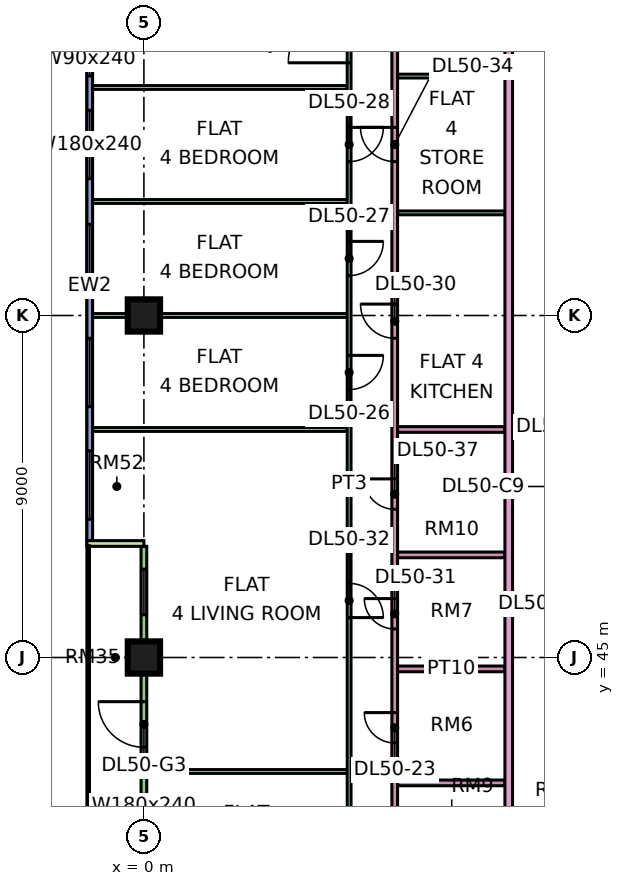
"""IFC4 building model, lengths in metres.
Left out: names, types, materials, properties, quantities, classifications, styles, units other than length and angle.
Written with IfcOpenShell. Run it as: python <this file> out.ifc"""

import sys

from ifc_helpers import new_model, si_unit, direction, frame, frame_2d, origin, origin_2d, place, context, subcontext, project, spatial, rectangle, extrude, element, fill, save


model = new_model("IFC4")
c1 = context("Model", 3, precision=1e-05, world=origin(), true_north=direction((0.0, 1.0)))
c2 = subcontext(c1, "Body", "Model", "MODEL_VIEW")
j1 = project(units=[si_unit("LENGTHUNIT", "METRE"), si_unit("PLANEANGLEUNIT", "RADIAN")], contexts=[c1])
p1 = place(None, origin())
s1 = spatial("IfcSite", under=j1, at=p1, CompositionType="ELEMENT")
p2 = place(p1, origin())
s2 = spatial("IfcBuilding", under=s1, at=p2, CompositionType="ELEMENT")
p3 = place(p2, frame((0.0, 0.0, 215.4)))
s3 = spatial("IfcBuildingStorey", under=s2, at=p3, CompositionType="ELEMENT", Elevation=215.4)
for number, where, z_axis, x_axis in (
    (1, (0.0, 45.0, 0.0), (0.0, 0.0, 1.0), (1.0, 0.0, 0.0)),
    (2, (0.0, 54.0, 0.0), (0.0, 0.0, 1.0), (1.0, 0.0, 0.0)),
):
    element("IfcColumn", number, at=place(p3, frame(where, z_axis=z_axis, x_axis=x_axis)), inside=s3, PredefinedType="COLUMN", context=c2, shape_type="SweptSolid", body=[
        extrude(rectangle(XDim=0.85, YDim=0.85, at=origin_2d()), origin(), (0.0, 0.0, 1.0), 3.75),
    ])
p4 = place(p3, frame((-1.425, 61.5, 0.0), z_axis=(0.0, 0.0, 1.0), x_axis=(0.0, -1.0, 0.0)))
e3 = element("IfcWall", 3, at=p4, inside=s3, PredefinedType="SOLIDWALL", context=c2, shape_type="SweptSolid", body=[
    extrude(rectangle(XDim=13.425, YDim=0.15, at=frame_2d((6.712, 0.0))), origin(), (0.0, 0.0, 1.0), 3.35),
])
p5 = place(p4, frame((0.3, 0.0, 0.45)))
e4 = element("IfcOpeningElement", 4, at=p5, cuts=e3, PredefinedType="OPENING", context=c2, shape_type="SweptSolid", body=[
    extrude(rectangle(XDim=0.9, YDim=2.4, at=frame_2d((0.45, 1.2))), frame((0.0, 0.085, 0.0), z_axis=(0.0, -1.0, 0.0), x_axis=(1.0, 0.0, 0.0)), (0.0, 0.0, 1.0), 0.17),
])
p6 = place(p4, frame((2.1, 0.0, 0.45)))
e5 = element("IfcOpeningElement", 5, at=p6, cuts=e3, PredefinedType="OPENING", context=c2, shape_type="SweptSolid", body=[
    extrude(rectangle(XDim=1.8, YDim=2.4, at=frame_2d((0.9, 1.2))), frame((0.0, 0.085, 0.0), z_axis=(0.0, -1.0, 0.0), x_axis=(1.0, 0.0, 0.0)), (0.0, 0.0, 1.0), 0.17),
])
p7 = place(p4, frame((5.1, 0.0, 0.45)))
e6 = element("IfcOpeningElement", 6, at=p7, cuts=e3, PredefinedType="OPENING", context=c2, shape_type="SweptSolid", body=[
    extrude(rectangle(XDim=1.8, YDim=2.4, at=frame_2d((0.9, 1.2))), frame((0.0, 0.085, 0.0), z_axis=(0.0, -1.0, 0.0), x_axis=(1.0, 0.0, 0.0)), (0.0, 0.0, 1.0), 0.17),
])
p8 = place(p4, frame((8.1, 0.0, 0.45)))
e7 = element("IfcOpeningElement", 7, at=p8, cuts=e3, PredefinedType="OPENING", context=c2, shape_type="SweptSolid", body=[
    extrude(rectangle(XDim=1.8, YDim=2.4, at=frame_2d((0.9, 1.2))), frame((0.0, 0.085, 0.0), z_axis=(0.0, -1.0, 0.0), x_axis=(1.0, 0.0, 0.0)), (0.0, 0.0, 1.0), 0.17),
])
p9 = place(p4, frame((11.062, 0.0, 0.45)))
e8 = element("IfcOpeningElement", 8, at=p9, cuts=e3, PredefinedType="OPENING", context=c2, shape_type="SweptSolid", body=[
    extrude(rectangle(XDim=1.8, YDim=2.4, at=frame_2d((0.9, 1.2))), frame((0.0, 0.085, 0.0), z_axis=(0.0, -1.0, 0.0), x_axis=(1.0, 0.0, 0.0)), (0.0, 0.0, 1.0), 0.17),
])
p10 = place(p3, frame((0.0, 47.925, 0.0), z_axis=(0.0, 0.0, 1.0), x_axis=(0.0, -1.0, 0.0)))
e9 = element("IfcWall", 9, at=p10, inside=s3, PredefinedType="SOLIDWALL", context=c2, shape_type="SweptSolid", body=[
    extrude(rectangle(XDim=11.85, YDim=0.15, at=frame_2d((5.925, 0.0))), origin(), (0.0, 0.0, 1.0), 3.35),
])
p11 = place(p10, frame((0.6, 0.0, 0.45)))
e10 = element("IfcOpeningElement", 10, at=p11, cuts=e9, PredefinedType="OPENING", context=c2, shape_type="SweptSolid", body=[
    extrude(rectangle(XDim=1.2, YDim=2.4, at=frame_2d((0.6, 1.2))), frame((0.0, 0.085, 0.0), z_axis=(0.0, -1.0, 0.0), x_axis=(1.0, 0.0, 0.0)), (0.0, 0.0, 1.0), 0.17),
])
p12 = place(p10, frame((4.087, 0.0, 0.0)))
e11 = element("IfcOpeningElement", 11, at=p12, cuts=e9, PredefinedType="OPENING", context=c2, shape_type="SweptSolid", body=[
    extrude(rectangle(XDim=1.2, YDim=2.4, at=frame_2d((0.6, 1.2))), frame((0.0, 0.085, 0.0), z_axis=(0.0, -1.0, 0.0), x_axis=(1.0, 0.0, 0.0)), (0.0, 0.0, 1.0), 0.17),
])
p13 = place(p10, frame((6.525, 0.0, 0.45)))
e12 = element("IfcOpeningElement", 12, at=p13, cuts=e9, PredefinedType="OPENING", context=c2, shape_type="SweptSolid", body=[
    extrude(rectangle(XDim=1.8, YDim=2.4, at=frame_2d((0.9, 1.2))), frame((0.0, 0.085, 0.0), z_axis=(0.0, -1.0, 0.0), x_axis=(1.0, 0.0, 0.0)), (0.0, 0.0, 1.0), 0.17),
])
p14 = place(p10, frame((9.562, 0.0, 0.45)))
e13 = element("IfcOpeningElement", 13, at=p14, cuts=e9, PredefinedType="OPENING", context=c2, shape_type="SweptSolid", body=[
    extrude(rectangle(XDim=1.2, YDim=2.4, at=frame_2d((0.6, 1.2))), frame((0.0, 0.085, 0.0), z_axis=(0.0, -1.0, 0.0), x_axis=(1.0, 0.0, 0.0)), (0.0, 0.0, 1.0), 0.17),
])
p15 = place(p3, frame((-1.5, 48.0, 0.0), z_axis=(0.0, 0.0, 1.0), x_axis=(1.0, 0.0, 0.0)))
e14 = element("IfcWall", 14, at=p15, inside=s3, PredefinedType="SOLIDWALL", context=c2, shape_type="SweptSolid", body=[
    extrude(rectangle(XDim=1.5, YDim=0.15, at=frame_2d((0.75, 0.0))), origin(), (0.0, 0.0, 1.0), 3.35),
])
for number, where, z_axis, x_axis in (
    (15, (-1.351, 54.0, 0.0), (0.0, 0.0, 1.0), (1.0, 0.0, 0.0)),
    (16, (-1.351, 57.0, 0.0), (0.0, 0.0, 1.0), (1.0, 0.0, 0.0)),
    (17, (-1.351, 60.0, 0.0), (0.0, 0.0, 1.0), (1.0, 0.0, 0.0)),
):
    element("IfcWall", number, at=place(p3, frame(where, z_axis=z_axis, x_axis=x_axis)), inside=s3, PredefinedType="PARTITIONING", context=c2, shape_type="SweptSolid", body=[
        extrude(rectangle(XDim=6.701, YDim=0.1, at=frame_2d((3.351, 0.0))), origin(), (0.0, 0.0, 1.0), 3.35),
    ])
p16 = place(p3, frame((-1.35, 51.0, 0.0), z_axis=(0.0, 0.0, 1.0), x_axis=(1.0, 0.0, 0.0)))
e18 = element("IfcWall", 18, at=p16, inside=s3, PredefinedType="PARTITIONING", context=c2, shape_type="SweptSolid", body=[
    extrude(rectangle(XDim=6.7, YDim=0.1, at=frame_2d((3.35, 0.0))), origin(), (0.0, 0.0, 1.0), 3.35),
])
p17 = place(p3, frame((0.074, 42.0, 0.0), z_axis=(0.0, 0.0, 1.0), x_axis=(1.0, 0.0, 0.0)))
e19 = element("IfcWall", 19, at=p17, inside=s3, PredefinedType="PARTITIONING", context=c2, shape_type="SweptSolid", body=[
    extrude(rectangle(XDim=5.276, YDim=0.1, at=frame_2d((2.638, 0.0))), origin(), (0.0, 0.0, 1.0), 3.35),
])
p18 = place(p3, frame((5.4, 36.1, 0.0), z_axis=(0.0, 0.0, 1.0), x_axis=(0.0, 1.0, 0.0)))
e20 = element("IfcWall", 20, at=p18, inside=s3, PredefinedType="PARTITIONING", context=c2, shape_type="SweptSolid", body=[
    extrude(rectangle(XDim=26.95, YDim=0.1, at=frame_2d((13.475, 0.0))), origin(), (0.0, 0.0, 1.0), 3.35),
])
p19 = place(p18, frame((0.95, 0.0, 0.0)))
e21 = element("IfcOpeningElement", 21, at=p19, cuts=e20, PredefinedType="OPENING", context=c2, shape_type="SweptSolid", body=[
    extrude(rectangle(XDim=0.9, YDim=2.1, at=frame_2d((0.45, 1.05))), frame((0.0, 0.06, 0.0), z_axis=(0.0, -1.0, 0.0), x_axis=(1.0, 0.0, 0.0)), (0.0, 0.0, 1.0), 0.12),
])
p20 = place(p18, frame((3.95, 0.0, 0.0)))
e22 = element("IfcOpeningElement", 22, at=p20, cuts=e20, PredefinedType="OPENING", context=c2, shape_type="SweptSolid", body=[
    extrude(rectangle(XDim=0.9, YDim=2.1, at=frame_2d((0.45, 1.05))), frame((0.0, 0.06, 0.0), z_axis=(0.0, -1.0, 0.0), x_axis=(1.0, 0.0, 0.0)), (0.0, 0.0, 1.0), 0.12),
])
p21 = place(p18, frame((15.95, 0.0, 0.0)))
e23 = element("IfcOpeningElement", 23, at=p21, cuts=e20, PredefinedType="OPENING", context=c2, shape_type="SweptSolid", body=[
    extrude(rectangle(XDim=0.9, YDim=2.1, at=frame_2d((0.45, 1.05))), frame((0.0, 0.06, 0.0), z_axis=(0.0, -1.0, 0.0), x_axis=(1.0, 0.0, 0.0)), (0.0, 0.0, 1.0), 0.12),
])
p22 = place(p18, frame((18.95, 0.0, 0.0)))
e24 = element("IfcOpeningElement", 24, at=p22, cuts=e20, PredefinedType="OPENING", context=c2, shape_type="SweptSolid", body=[
    extrude(rectangle(XDim=0.9, YDim=2.1, at=frame_2d((0.45, 1.05))), frame((0.0, 0.06, 0.0), z_axis=(0.0, -1.0, 0.0), x_axis=(1.0, 0.0, 0.0)), (0.0, 0.0, 1.0), 0.12),
])
p23 = place(p18, frame((21.95, 0.0, 0.0)))
e25 = element("IfcOpeningElement", 25, at=p23, cuts=e20, PredefinedType="OPENING", context=c2, shape_type="SweptSolid", body=[
    extrude(rectangle(XDim=0.9, YDim=2.1, at=frame_2d((0.45, 1.05))), frame((0.0, 0.06, 0.0), z_axis=(0.0, -1.0, 0.0), x_axis=(1.0, 0.0, 0.0)), (0.0, 0.0, 1.0), 0.12),
])
p24 = place(p18, frame((9.95, 0.0, 0.0)))
e26 = element("IfcOpeningElement", 26, at=p24, cuts=e20, PredefinedType="OPENING", context=c2, shape_type="SweptSolid", body=[
    extrude(rectangle(XDim=0.9, YDim=2.1, at=frame_2d((0.45, 1.05))), frame((0.0, 0.06, 0.0), z_axis=(0.0, -1.0, 0.0), x_axis=(1.0, 0.0, 0.0)), (0.0, 0.0, 1.0), 0.12),
])
p25 = place(p18, frame((24.55, 0.0, 0.0)))
e27 = element("IfcOpeningElement", 27, at=p25, cuts=e20, PredefinedType="OPENING", context=c2, shape_type="SweptSolid", body=[
    extrude(rectangle(XDim=1.6, YDim=2.1, at=frame_2d((0.8, 1.05))), frame((0.0, 0.06, 0.0), z_axis=(0.0, -1.0, 0.0), x_axis=(1.0, 0.0, 0.0)), (0.0, 0.0, 1.0), 0.12),
])
p26 = place(p3, frame((6.6, 39.525, 0.0), z_axis=(0.0, 0.0, 1.0), x_axis=(0.0, 1.0, 0.0)))
e28 = element("IfcWall", 28, at=p26, inside=s3, PredefinedType="PARTITIONING", context=c2, shape_type="SweptSolid", body=[
    extrude(rectangle(XDim=24.825, YDim=0.15, at=frame_2d((12.413, 0.0))), origin(), (0.0, 0.0, 1.0), 3.35),
])
p27 = place(p26, frame((3.225, 0.0, 0.0)))
e29 = element("IfcOpeningElement", 29, at=p27, cuts=e28, PredefinedType="OPENING", context=c2, shape_type="SweptSolid", body=[
    extrude(rectangle(XDim=0.8, YDim=2.1, at=frame_2d((0.4, 1.05))), frame((0.0, 0.085, 0.0), z_axis=(0.0, -1.0, 0.0), x_axis=(1.0, 0.0, 0.0)), (0.0, 0.0, 1.0), 0.17),
])
p28 = place(p26, frame((13.875, 0.0, 0.0)))
e30 = element("IfcOpeningElement", 30, at=p28, cuts=e28, PredefinedType="OPENING", context=c2, shape_type="SweptSolid", body=[
    extrude(rectangle(XDim=0.9, YDim=2.1, at=frame_2d((0.45, 1.05))), frame((0.0, 0.085, 0.0), z_axis=(0.0, -1.0, 0.0), x_axis=(1.0, 0.0, 0.0)), (0.0, 0.0, 1.0), 0.17),
])
p29 = place(p26, frame((6.225, 0.0, 0.0)))
e31 = element("IfcOpeningElement", 31, at=p29, cuts=e28, PredefinedType="OPENING", context=c2, shape_type="SweptSolid", body=[
    extrude(rectangle(XDim=0.8, YDim=2.1, at=frame_2d((0.4, 1.05))), frame((0.0, 0.085, 0.0), z_axis=(0.0, -1.0, 0.0), x_axis=(1.0, 0.0, 0.0)), (0.0, 0.0, 1.0), 0.17),
])
p30 = place(p26, frame((18.525, 0.0, 0.0)))
e32 = element("IfcOpeningElement", 32, at=p30, cuts=e28, PredefinedType="OPENING", context=c2, shape_type="SweptSolid", body=[
    extrude(rectangle(XDim=0.9, YDim=2.1, at=frame_2d((0.45, 1.05))), frame((0.0, 0.085, 0.0), z_axis=(0.0, -1.0, 0.0), x_axis=(1.0, 0.0, 0.0)), (0.0, 0.0, 1.0), 0.17),
])
p31 = place(p26, frame((21.675, 0.0, 0.0)))
e33 = element("IfcOpeningElement", 33, at=p31, cuts=e28, PredefinedType="OPENING", context=c2, shape_type="SweptSolid", body=[
    extrude(rectangle(XDim=0.9, YDim=2.1, at=frame_2d((0.45, 1.05))), frame((0.0, 0.085, 0.0), z_axis=(0.0, -1.0, 0.0), x_axis=(1.0, 0.0, 0.0)), (0.0, 0.0, 1.0), 0.17),
])
p32 = place(p26, frame((9.375, 0.0, 0.0)))
e34 = element("IfcOpeningElement", 34, at=p32, cuts=e28, PredefinedType="OPENING", context=c2, shape_type="SweptSolid", body=[
    extrude(rectangle(XDim=0.8, YDim=2.1, at=frame_2d((0.4, 1.05))), frame((0.0, 0.085, 0.0), z_axis=(0.0, -1.0, 0.0), x_axis=(1.0, 0.0, 0.0)), (0.0, 0.0, 1.0), 0.17),
])
for number, where, z_axis, x_axis in (
    (35, (6.675, 41.7, 0.0), (0.0, 0.0, 1.0), (1.0, 0.0, 0.0)),
    (36, (6.675, 44.7, 0.0), (0.0, 0.0, 1.0), (1.0, 0.0, 0.0)),
    (37, (6.675, 47.7, 0.0), (0.0, 0.0, 1.0), (1.0, 0.0, 0.0)),
    (38, (6.675, 51.0, 0.0), (0.0, 0.0, 1.0), (1.0, 0.0, 0.0)),
):
    element("IfcWall", number, at=place(p3, frame(where, z_axis=z_axis, x_axis=x_axis)), inside=s3, PredefinedType="PARTITIONING", context=c2, shape_type="SweptSolid", body=[
        extrude(rectangle(XDim=2.825, YDim=0.15, at=frame_2d((1.413, 0.0))), origin(), (0.0, 0.0, 1.0), 3.35),
    ])
for number, where, z_axis, x_axis in (
    (39, (6.675, 56.7, 0.0), (0.0, 0.0, 1.0), (1.0, 0.0, 0.0)),
    (40, (6.675, 60.3, 0.0), (0.0, 0.0, 1.0), (1.0, 0.0, 0.0)),
):
    element("IfcWall", number, at=place(p3, frame(where, z_axis=z_axis, x_axis=x_axis)), inside=s3, PredefinedType="PARTITIONING", context=c2, shape_type="SweptSolid", body=[
        extrude(rectangle(XDim=2.825, YDim=0.1, at=frame_2d((1.413, 0.0))), origin(), (0.0, 0.0, 1.0), 3.35),
    ])
p33 = place(p3, frame((9.6, 20.0, 0.0), z_axis=(0.0, 0.0, 1.0), x_axis=(0.0, 1.0, 0.0)))
e41 = element("IfcWall", 41, at=p33, inside=s3, PredefinedType="PARTITIONING", context=c2, shape_type="SweptSolid", body=[
    extrude(rectangle(XDim=44.35, YDim=0.2, at=frame_2d((22.175, 0.0))), origin(), (0.0, 0.0, 1.0), 3.35),
])
p34 = place(p33, frame((17.25, 0.0, 0.0)))
e42 = element("IfcOpeningElement", 42, at=p34, cuts=e41, PredefinedType="OPENING", context=c2, shape_type="SweptSolid", body=[
    extrude(rectangle(XDim=1.0, YDim=2.1, at=frame_2d((0.5, 1.05))), frame((0.0, 0.11, 0.0), z_axis=(0.0, -1.0, 0.0), x_axis=(1.0, 0.0, 0.0)), (0.0, 0.0, 1.0), 0.22),
])
p35 = place(p33, frame((0.6, 0.0, 0.0)))
e43 = element("IfcOpeningElement", 43, at=p35, cuts=e41, PredefinedType="OPENING", context=c2, shape_type="SweptSolid", body=[
    extrude(rectangle(XDim=1.2, YDim=2.1, at=frame_2d((0.6, 1.05))), frame((0.0, 0.11, 0.0), z_axis=(0.0, -1.0, 0.0), x_axis=(1.0, 0.0, 0.0)), (0.0, 0.0, 1.0), 0.22),
])
p36 = place(p33, frame((4.35, 0.0, 0.0)))
e44 = element("IfcOpeningElement", 44, at=p36, cuts=e41, PredefinedType="OPENING", context=c2, shape_type="SweptSolid", body=[
    extrude(rectangle(XDim=1.0, YDim=2.1, at=frame_2d((0.5, 1.05))), frame((0.0, 0.11, 0.0), z_axis=(0.0, -1.0, 0.0), x_axis=(1.0, 0.0, 0.0)), (0.0, 0.0, 1.0), 0.22),
])
p37 = place(p5, origin())
e45 = element("IfcWindow", 45, at=p37, inside=s3, PartitioningType="SINGLE_PANEL", PredefinedType="WINDOW", context=c2, shape_type="SweptSolid", body=[
    extrude(rectangle(XDim=0.9, YDim=2.4, at=frame_2d((0.45, 1.2))), frame((0.0, 0.03, 0.0), z_axis=(0.0, -1.0, 0.0), x_axis=(1.0, 0.0, 0.0)), (0.0, 0.0, 1.0), 0.06),
])
fill(e4, e45)
p38 = place(p6, origin())
e46 = element("IfcWindow", 46, at=p38, inside=s3, PartitioningType="SINGLE_PANEL", PredefinedType="WINDOW", context=c2, shape_type="SweptSolid", body=[
    extrude(rectangle(XDim=1.8, YDim=2.4, at=frame_2d((0.9, 1.2))), frame((0.0, 0.03, 0.0), z_axis=(0.0, -1.0, 0.0), x_axis=(1.0, 0.0, 0.0)), (0.0, 0.0, 1.0), 0.06),
])
fill(e5, e46)
p39 = place(p7, origin())
e47 = element("IfcWindow", 47, at=p39, inside=s3, PartitioningType="SINGLE_PANEL", PredefinedType="WINDOW", context=c2, shape_type="SweptSolid", body=[
    extrude(rectangle(XDim=1.8, YDim=2.4, at=frame_2d((0.9, 1.2))), frame((0.0, 0.03, 0.0), z_axis=(0.0, -1.0, 0.0), x_axis=(1.0, 0.0, 0.0)), (0.0, 0.0, 1.0), 0.06),
])
fill(e6, e47)
p40 = place(p8, origin())
e48 = element("IfcWindow", 48, at=p40, inside=s3, PartitioningType="SINGLE_PANEL", PredefinedType="WINDOW", context=c2, shape_type="SweptSolid", body=[
    extrude(rectangle(XDim=1.8, YDim=2.4, at=frame_2d((0.9, 1.2))), frame((0.0, 0.03, 0.0), z_axis=(0.0, -1.0, 0.0), x_axis=(1.0, 0.0, 0.0)), (0.0, 0.0, 1.0), 0.06),
])
fill(e7, e48)
p41 = place(p9, origin())
e49 = element("IfcWindow", 49, at=p41, inside=s3, PartitioningType="SINGLE_PANEL", PredefinedType="WINDOW", context=c2, shape_type="SweptSolid", body=[
    extrude(rectangle(XDim=1.8, YDim=2.4, at=frame_2d((0.9, 1.2))), frame((0.0, 0.03, 0.0), z_axis=(0.0, -1.0, 0.0), x_axis=(1.0, 0.0, 0.0)), (0.0, 0.0, 1.0), 0.06),
])
fill(e8, e49)
p42 = place(p11, origin())
e50 = element("IfcWindow", 50, at=p42, inside=s3, PartitioningType="SINGLE_PANEL", PredefinedType="WINDOW", context=c2, shape_type="SweptSolid", body=[
    extrude(rectangle(XDim=1.2, YDim=2.4, at=frame_2d((0.6, 1.2))), frame((0.0, 0.03, 0.0), z_axis=(0.0, -1.0, 0.0), x_axis=(1.0, 0.0, 0.0)), (0.0, 0.0, 1.0), 0.06),
])
fill(e10, e50)
p43 = place(p12, frame((1.2, 0.0, 0.0), z_axis=(0.0, 0.0, 1.0), x_axis=(-1.0, 0.0, 0.0)))
e51 = element("IfcDoor", 51, at=p43, inside=s3, OperationType="DOUBLE_DOOR_SINGLE_SWING", PredefinedType="DOOR", context=c2, shape_type="SweptSolid", body=[
    extrude(rectangle(XDim=1.2, YDim=2.4, at=frame_2d((0.6, 1.2))), frame((0.0, 0.025, 0.0), z_axis=(0.0, -1.0, 0.0), x_axis=(1.0, 0.0, 0.0)), (0.0, 0.0, 1.0), 0.05),
])
fill(e11, e51)
p44 = place(p13, origin())
e52 = element("IfcWindow", 52, at=p44, inside=s3, PartitioningType="SINGLE_PANEL", PredefinedType="WINDOW", context=c2, shape_type="SweptSolid", body=[
    extrude(rectangle(XDim=1.8, YDim=2.4, at=frame_2d((0.9, 1.2))), frame((0.0, 0.03, 0.0), z_axis=(0.0, -1.0, 0.0), x_axis=(1.0, 0.0, 0.0)), (0.0, 0.0, 1.0), 0.06),
])
fill(e12, e52)
p45 = place(p27, frame((0.8, 0.0, 0.0), z_axis=(0.0, 0.0, 1.0), x_axis=(-1.0, 0.0, 0.0)))
e53 = element("IfcDoor", 53, at=p45, inside=s3, OperationType="SINGLE_SWING_RIGHT", PredefinedType="DOOR", context=c2, shape_type="SweptSolid", body=[
    extrude(rectangle(XDim=0.8, YDim=2.1, at=frame_2d((0.4, 1.05))), frame((0.0, 0.025, 0.0), z_axis=(0.0, -1.0, 0.0), x_axis=(1.0, 0.0, 0.0)), (0.0, 0.0, 1.0), 0.05),
])
fill(e29, e53)
p46 = place(p21, origin())
e54 = element("IfcDoor", 54, at=p46, inside=s3, OperationType="SINGLE_SWING_RIGHT", PredefinedType="DOOR", context=c2, shape_type="SweptSolid", body=[
    extrude(rectangle(XDim=0.9, YDim=2.1, at=frame_2d((0.45, 1.05))), frame((0.0, 0.025, 0.0), z_axis=(0.0, -1.0, 0.0), x_axis=(1.0, 0.0, 0.0)), (0.0, 0.0, 1.0), 0.05),
])
fill(e23, e54)
p47 = place(p22, origin())
e55 = element("IfcDoor", 55, at=p47, inside=s3, OperationType="SINGLE_SWING_RIGHT", PredefinedType="DOOR", context=c2, shape_type="SweptSolid", body=[
    extrude(rectangle(XDim=0.9, YDim=2.1, at=frame_2d((0.45, 1.05))), frame((0.0, 0.025, 0.0), z_axis=(0.0, -1.0, 0.0), x_axis=(1.0, 0.0, 0.0)), (0.0, 0.0, 1.0), 0.05),
])
fill(e24, e55)
p48 = place(p23, origin())
e56 = element("IfcDoor", 56, at=p48, inside=s3, OperationType="SINGLE_SWING_RIGHT", PredefinedType="DOOR", context=c2, shape_type="SweptSolid", body=[
    extrude(rectangle(XDim=0.9, YDim=2.1, at=frame_2d((0.45, 1.05))), frame((0.0, 0.025, 0.0), z_axis=(0.0, -1.0, 0.0), x_axis=(1.0, 0.0, 0.0)), (0.0, 0.0, 1.0), 0.05),
])
fill(e25, e56)
p49 = place(p28, frame((0.9, 0.0, 0.0), z_axis=(0.0, 0.0, 1.0), x_axis=(-1.0, 0.0, 0.0)))
e57 = element("IfcDoor", 57, at=p49, inside=s3, OperationType="SINGLE_SWING_RIGHT", PredefinedType="DOOR", context=c2, shape_type="SweptSolid", body=[
    extrude(rectangle(XDim=0.9, YDim=2.1, at=frame_2d((0.45, 1.05))), frame((0.0, 0.025, 0.0), z_axis=(0.0, -1.0, 0.0), x_axis=(1.0, 0.0, 0.0)), (0.0, 0.0, 1.0), 0.05),
])
fill(e30, e57)
p50 = place(p29, frame((0.8, 0.0, 0.0), z_axis=(0.0, 0.0, 1.0), x_axis=(-1.0, 0.0, 0.0)))
e58 = element("IfcDoor", 58, at=p50, inside=s3, OperationType="SINGLE_SWING_RIGHT", PredefinedType="DOOR", context=c2, shape_type="SweptSolid", body=[
    extrude(rectangle(XDim=0.8, YDim=2.1, at=frame_2d((0.4, 1.05))), frame((0.0, 0.025, 0.0), z_axis=(0.0, -1.0, 0.0), x_axis=(1.0, 0.0, 0.0)), (0.0, 0.0, 1.0), 0.05),
])
fill(e31, e58)
p51 = place(p24, frame((0.9, 0.0, 0.0), z_axis=(0.0, 0.0, 1.0), x_axis=(-1.0, 0.0, 0.0)))
e59 = element("IfcDoor", 59, at=p51, inside=s3, OperationType="SINGLE_SWING_LEFT", PredefinedType="DOOR", context=c2, shape_type="SweptSolid", body=[
    extrude(rectangle(XDim=0.9, YDim=2.1, at=frame_2d((0.45, 1.05))), frame((0.0, 0.025, 0.0), z_axis=(0.0, -1.0, 0.0), x_axis=(1.0, 0.0, 0.0)), (0.0, 0.0, 1.0), 0.05),
])
fill(e26, e59)
p52 = place(p25, origin())
e60 = element("IfcDoor", 60, at=p52, inside=s3, OperationType="DOUBLE_DOOR_SINGLE_SWING", PredefinedType="DOOR", context=c2, shape_type="SweptSolid", body=[
    extrude(rectangle(XDim=1.6, YDim=2.1, at=frame_2d((0.8, 1.05))), frame((0.0, 0.025, 0.0), z_axis=(0.0, -1.0, 0.0), x_axis=(1.0, 0.0, 0.0)), (0.0, 0.0, 1.0), 0.05),
])
fill(e27, e60)
p53 = place(p30, frame((0.9, 0.0, 0.0), z_axis=(0.0, 0.0, 1.0), x_axis=(-1.0, 0.0, 0.0)))
e61 = element("IfcDoor", 61, at=p53, inside=s3, OperationType="SINGLE_SWING_RIGHT", PredefinedType="DOOR", context=c2, shape_type="SweptSolid", body=[
    extrude(rectangle(XDim=0.9, YDim=2.1, at=frame_2d((0.45, 1.05))), frame((0.0, 0.025, 0.0), z_axis=(0.0, -1.0, 0.0), x_axis=(1.0, 0.0, 0.0)), (0.0, 0.0, 1.0), 0.05),
])
fill(e32, e61)
p54 = place(p32, frame((0.8, 0.0, 0.0), z_axis=(0.0, 0.0, 1.0), x_axis=(-1.0, 0.0, 0.0)))
e62 = element("IfcDoor", 62, at=p54, inside=s3, OperationType="SINGLE_SWING_RIGHT", PredefinedType="DOOR", context=c2, shape_type="SweptSolid", body=[
    extrude(rectangle(XDim=0.8, YDim=2.1, at=frame_2d((0.4, 1.05))), frame((0.0, 0.025, 0.0), z_axis=(0.0, -1.0, 0.0), x_axis=(1.0, 0.0, 0.0)), (0.0, 0.0, 1.0), 0.05),
])
fill(e34, e62)
save(model, sys.argv[1])
